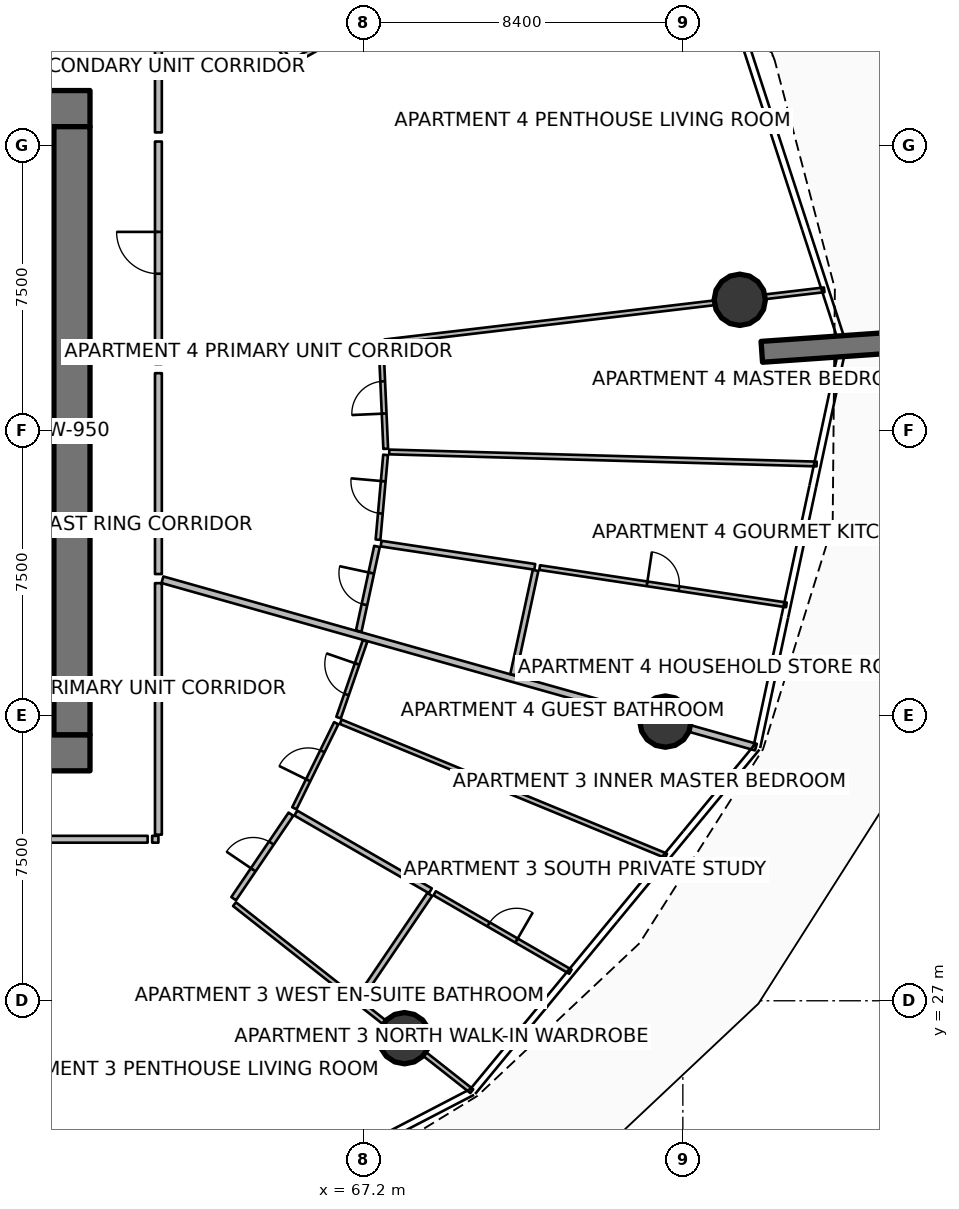
"""IFC4 building model, lengths in metres.
Left out: names, types, materials, properties, quantities, classifications, styles, units other than length and angle.
Written with IfcOpenShell. Run it as: python <this file> out.ifc"""

import sys

from ifc_helpers import new_model, si_unit, direction, frame, frame_2d, origin, origin_2d, place, context, subcontext, project, spatial, rectangle, circle, extrude, element, fill, save


model = new_model("IFC4")
c1 = context("Model", 3, precision=1e-05, world=origin(), true_north=direction((0.0, 1.0)))
c2 = subcontext(c1, "Body", "Model", "MODEL_VIEW")
j1 = project(units=[si_unit("LENGTHUNIT", "METRE"), si_unit("PLANEANGLEUNIT", "RADIAN")], contexts=[c1])
p1 = place(None, origin())
s1 = spatial("IfcSite", under=j1, at=p1, CompositionType="ELEMENT")
p2 = place(p1, origin())
s2 = spatial("IfcBuilding", under=s1, at=p2, CompositionType="ELEMENT")
p3 = place(p2, frame((0.0, 0.0, 26.4)))
s3 = spatial("IfcBuildingStorey", under=s2, at=p3, CompositionType="ELEMENT", Elevation=26.4)
for number, where, z_axis, x_axis in (
    (1, (49.95, 33.525, 0.0), (0.0, 0.0, 1.0), (1.0, 0.0, 0.0)),
    (2, (49.95, 50.475, 0.0), (0.0, 0.0, 1.0), (1.0, 0.0, 0.0)),
):
    element("IfcWall", number, at=place(p3, frame(where, z_axis=z_axis, x_axis=x_axis)), inside=s3, PredefinedType="SHEAR", context=c2, shape_type="SweptSolid", body=[
        extrude(rectangle(XDim=10.05, YDim=0.95, at=frame_2d((5.025, 0.0))), origin(), (0.0, 0.0, 1.0), 3.75),
    ])
p4 = place(p3, frame((59.525, 34.0, 0.0), z_axis=(0.0, 0.0, 1.0), x_axis=(0.0, 1.0, 0.0)))
e3 = element("IfcWall", 3, at=p4, inside=s3, PredefinedType="SHEAR", context=c2, shape_type="SweptSolid", body=[
    extrude(rectangle(XDim=16.0, YDim=0.95, at=frame_2d((8.0, 0.0))), origin(), (0.0, 0.0, 1.0), 3.75),
])
p5 = place(p3, frame((77.678, 44.075, 0.0), z_axis=(0.0, 0.0, 1.0), x_axis=(0.997564163539, 0.069754853754, 0.0)))
e4 = element("IfcWall", 4, at=p5, inside=s3, PredefinedType="SOLIDWALL", context=c2, shape_type="SweptSolid", body=[
    extrude(rectangle(XDim=3.5, YDim=0.55, at=frame_2d((1.75, 0.0))), origin(), (0.0, 0.0, 1.0), 3.75),
])
for number, where, z_axis, x_axis in (
    (5, (68.276, 26.016, 0.0), (0.0, 0.0, 1.0), (1.0, 0.0, 0.0)),
    (6, (75.141, 34.345, 0.0), (0.0, 0.0, 1.0), (1.0, 0.0, 0.0)),
    (7, (77.098, 45.444, 0.0), (0.0, 0.0, 1.0), (1.0, 0.0, 0.0)),
):
    element("IfcColumn", number, at=place(p3, frame(where, z_axis=z_axis, x_axis=x_axis)), inside=s3, PredefinedType="COLUMN", context=c2, shape_type="SweptSolid", body=[
        extrude(circle(Radius=0.675, at=origin_2d()), origin(), (0.0, 0.0, 1.0), 3.5),
    ])
p6 = place(p3, frame((51.48, 46.62, 0.0), z_axis=(0.0, 0.0, 1.0), x_axis=(1.0, 0.0, 0.0)))
e8 = element("IfcWall", 8, at=p6, inside=s3, PredefinedType="SOLIDWALL", context=c2, shape_type="SweptSolid", body=[
    extrude(rectangle(XDim=7.54, YDim=0.25, at=frame_2d((3.77, 0.0))), origin(), (0.0, 0.0, 1.0), 3.5),
])
p7 = place(p6, frame((0.3, 0.0, 0.0)))
e9 = element("IfcOpeningElement", 9, at=p7, cuts=e8, PredefinedType="OPENING", context=c2, shape_type="SweptSolid", body=[
    extrude(rectangle(XDim=1.55, YDim=2.15, at=frame_2d((0.775, 1.075))), frame((0.0, 0.135, 0.0), z_axis=(0.0, -1.0, 0.0), x_axis=(1.0, 0.0, 0.0)), (0.0, 0.0, 1.0), 0.27),
])
p8 = place(p3, frame((51.48, 37.38, 0.0), z_axis=(0.0, 0.0, 1.0), x_axis=(1.0, 0.0, 0.0)))
e10 = element("IfcWall", 10, at=p8, inside=s3, PredefinedType="SOLIDWALL", context=c2, shape_type="SweptSolid", body=[
    extrude(rectangle(XDim=7.54, YDim=0.25, at=frame_2d((3.77, 0.0))), origin(), (0.0, 0.0, 1.0), 3.5),
])
p9 = place(p8, frame((0.3, 0.0, 0.0)))
e11 = element("IfcOpeningElement", 11, at=p9, cuts=e10, PredefinedType="OPENING", context=c2, shape_type="SweptSolid", body=[
    extrude(rectangle(XDim=1.55, YDim=2.15, at=frame_2d((0.775, 1.075))), frame((0.0, 0.135, 0.0), z_axis=(0.0, -1.0, 0.0), x_axis=(1.0, 0.0, 0.0)), (0.0, 0.0, 1.0), 0.27),
])
p10 = place(p3, frame((61.906, 38.078, 0.0), z_axis=(0.0, 0.0, 1.0), x_axis=(0.962456328357, -0.271436578238, 0.0)))
e12 = element("IfcWall", 12, at=p10, inside=s3, PredefinedType="PARTITIONING", context=c2, shape_type="SweptSolid", body=[
    extrude(rectangle(XDim=16.226, YDim=0.18, at=frame_2d((8.113, 0.0))), origin(), (0.0, 0.0, 1.0), 2.867),
])
p11 = place(p3, frame((54.14, 31.25, 0.0), z_axis=(0.0, 0.0, 1.0), x_axis=(1.0, 0.0, 0.0)))
e13 = element("IfcWall", 13, at=p11, inside=s3, PredefinedType="PARTITIONING", context=c2, shape_type="SweptSolid", body=[
    extrude(rectangle(XDim=7.376, YDim=0.18, at=frame_2d((3.688, 0.0))), origin(), (0.0, 0.0, 1.0), 2.867),
])
p12 = place(p11, frame((3.138, 0.0, 0.0)))
e14 = element("IfcOpeningElement", 14, at=p12, cuts=e13, PredefinedType="OPENING", context=c2, shape_type="SweptSolid", body=[
    extrude(rectangle(XDim=1.1, YDim=2.1, at=frame_2d((0.55, 1.05))), frame((0.0, 0.1, 0.0), z_axis=(0.0, -1.0, 0.0), x_axis=(1.0, 0.0, 0.0)), (0.0, 0.0, 1.0), 0.2),
])
p13 = place(p3, frame((57.833, 24.443, 0.0), z_axis=(0.0, 0.0, 1.0), x_axis=(0.488621028367, -0.872496126431, 0.0)))
e15 = element("IfcWall", 15, at=p13, inside=s3, PredefinedType="PARTITIONING", context=c2, shape_type="SweptSolid", body=[
    extrude(rectangle(XDim=5.473, YDim=0.125, at=frame_2d((2.736, 0.0))), origin(), (0.0, 0.0, 1.0), 2.867),
])
p14 = place(p3, frame((61.636, 31.25, 0.0), z_axis=(0.0, 0.0, 1.0), x_axis=(1.0, 0.0, 0.0)))
e16 = element("IfcWall", 16, at=p14, inside=s3, PredefinedType="PARTITIONING", context=c2, shape_type="SweptSolid", body=[
    extrude(rectangle(XDim=0.164, YDim=0.18, at=frame_2d((0.082, 0.0))), origin(), (0.0, 0.0, 1.0), 2.867),
])
p15 = place(p3, frame((61.8, 31.37, 0.0), z_axis=(0.0, 0.0, 1.0), x_axis=(0.0, 1.0, 0.0)))
e17 = element("IfcWall", 17, at=p15, inside=s3, PredefinedType="PARTITIONING", context=c2, shape_type="SweptSolid", body=[
    extrude(rectangle(XDim=6.618, YDim=0.18, at=frame_2d((3.309, 0.0))), origin(), (0.0, 0.0, 1.0), 2.867),
])
p16 = place(p3, frame((63.803, 29.542, 0.0), z_axis=(0.0, 0.0, 1.0), x_axis=(0.785316547054, -0.619094436191, 0.0)))
e18 = element("IfcWall", 18, at=p16, inside=s3, PredefinedType="PARTITIONING", context=c2, shape_type="SweptSolid", body=[
    extrude(rectangle(XDim=7.949, YDim=0.125, at=frame_2d((3.975, 0.0))), origin(), (0.0, 0.0, 1.0), 2.867),
])
p17 = place(p3, frame((63.781, 29.687, 0.0), z_axis=(0.0, 0.0, 1.0), x_axis=(0.561145635053, 0.82771708709, 0.0)))
e19 = element("IfcWall", 19, at=p17, inside=s3, PredefinedType="PARTITIONING", context=c2, shape_type="SweptSolid", body=[
    extrude(rectangle(XDim=2.685, YDim=0.15, at=frame_2d((1.343, 0.0))), origin(), (0.0, 0.0, 1.0), 2.867),
])
p18 = place(p17, frame((0.918, 0.0, 0.0)))
e20 = element("IfcOpeningElement", 20, at=p18, cuts=e19, PredefinedType="OPENING", context=c2, shape_type="SweptSolid", body=[
    extrude(rectangle(XDim=0.85, YDim=2.06, at=frame_2d((0.425, 1.03))), frame((0.0, 0.085, 0.0), z_axis=(0.0, -1.0, 0.0), x_axis=(1.0, 0.0, 0.0)), (0.0, 0.0, 1.0), 0.17),
])
p19 = place(p3, frame((67.094, 27.074, 0.0), z_axis=(0.0, 0.0, 1.0), x_axis=(0.561136770773, 0.827723096504, 0.0)))
e21 = element("IfcWall", 21, at=p19, inside=s3, PredefinedType="PARTITIONING", context=c2, shape_type="SweptSolid", body=[
    extrude(rectangle(XDim=3.292, YDim=0.15, at=frame_2d((1.646, 0.0))), origin(), (0.0, 0.0, 1.0), 2.867),
])
p20 = place(p3, frame((65.416, 31.939, 0.0), z_axis=(0.0, 0.0, 1.0), x_axis=(0.865897249189, -0.500221904605, 0.0)))
e22 = element("IfcWall", 22, at=p20, inside=s3, PredefinedType="PARTITIONING", context=c2, shape_type="SweptSolid", body=[
    extrude(rectangle(XDim=4.09, YDim=0.15, at=frame_2d((2.045, 0.0))), origin(), (0.0, 0.0, 1.0), 2.94),
])
p21 = place(p3, frame((69.07, 29.828, 0.0), z_axis=(0.0, 0.0, 1.0), x_axis=(0.865913497337, -0.50019377758, 0.0)))
e23 = element("IfcWall", 23, at=p21, inside=s3, PredefinedType="PARTITIONING", context=c2, shape_type="SweptSolid", body=[
    extrude(rectangle(XDim=4.125, YDim=0.125, at=frame_2d((2.062, 0.0))), origin(), (0.0, 0.0, 1.0), 2.94),
])
p22 = place(p21, frame((1.637, 0.0, 0.0)))
e24 = element("IfcOpeningElement", 24, at=p22, cuts=e23, PredefinedType="OPENING", context=c2, shape_type="SweptSolid", body=[
    extrude(rectangle(XDim=0.85, YDim=2.06, at=frame_2d((0.425, 1.03))), frame((0.0, 0.073, 0.0), z_axis=(0.0, -1.0, 0.0), x_axis=(1.0, 0.0, 0.0)), (0.0, 0.0, 1.0), 0.145),
])
p23 = place(p3, frame((66.598, 34.341, 0.0), z_axis=(0.0, 0.0, 1.0), x_axis=(0.924661718137, -0.380789583645, 0.0)))
e25 = element("IfcWall", 25, at=p23, inside=s3, PredefinedType="PARTITIONING", context=c2, shape_type="SweptSolid", body=[
    extrude(rectangle(XDim=9.261, YDim=0.125, at=frame_2d((4.63, 0.0))), origin(), (0.0, 0.0, 1.0), 2.94),
])
p24 = place(p3, frame((65.377, 32.065, 0.0), z_axis=(0.0, 0.0, 1.0), x_axis=(0.441490145673, 0.897266098364, 0.0)))
e26 = element("IfcWall", 26, at=p24, inside=s3, PredefinedType="PARTITIONING", context=c2, shape_type="SweptSolid", body=[
    extrude(rectangle(XDim=2.495, YDim=0.125, at=frame_2d((1.248, 0.0))), origin(), (0.0, 0.0, 1.0), 2.94),
])
p25 = place(p24, frame((0.823, 0.0, 0.0)))
e27 = element("IfcOpeningElement", 27, at=p25, cuts=e26, PredefinedType="OPENING", context=c2, shape_type="SweptSolid", body=[
    extrude(rectangle(XDim=0.85, YDim=2.06, at=frame_2d((0.425, 1.03))), frame((0.0, 0.073, 0.0), z_axis=(0.0, -1.0, 0.0), x_axis=(1.0, 0.0, 0.0)), (0.0, 0.0, 1.0), 0.145),
])
p26 = place(p3, frame((66.541, 34.451, 0.0), z_axis=(0.0, 0.0, 1.0), x_axis=(0.326627883033, 0.945153017255, 0.0)))
e28 = element("IfcWall", 28, at=p26, inside=s3, PredefinedType="PARTITIONING", context=c2, shape_type="SweptSolid", body=[
    extrude(rectangle(XDim=2.137, YDim=0.125, at=frame_2d((1.068, 0.0))), origin(), (0.0, 0.0, 1.0), 2.867),
])
p27 = place(p26, frame((0.643, 0.0, 0.0)))
e29 = element("IfcOpeningElement", 29, at=p27, cuts=e28, PredefinedType="OPENING", context=c2, shape_type="SweptSolid", body=[
    extrude(rectangle(XDim=0.85, YDim=2.06, at=frame_2d((0.425, 1.03))), frame((0.0, 0.073, 0.0), z_axis=(0.0, -1.0, 0.0), x_axis=(1.0, 0.0, 0.0)), (0.0, 0.0, 1.0), 0.145),
])
p28 = place(p3, frame((61.8, 43.753, 0.0), z_axis=(0.0, 0.0, 1.0), x_axis=(0.0, 1.0, 0.0)))
e30 = element("IfcWall", 30, at=p28, inside=s3, PredefinedType="PARTITIONING", context=c2, shape_type="SweptSolid", body=[
    extrude(rectangle(XDim=5.855, YDim=0.18, at=frame_2d((2.927, 0.0))), origin(), (0.0, 0.0, 1.0), 2.867),
])
p29 = place(p28, frame((2.378, 0.0, 0.0)))
e31 = element("IfcOpeningElement", 31, at=p29, cuts=e30, PredefinedType="OPENING", context=c2, shape_type="SweptSolid", body=[
    extrude(rectangle(XDim=1.1, YDim=2.1, at=frame_2d((0.55, 1.05))), frame((0.0, 0.1, 0.0), z_axis=(0.0, -1.0, 0.0), x_axis=(1.0, 0.0, 0.0)), (0.0, 0.0, 1.0), 0.2),
])
p30 = place(p3, frame((61.8, 38.228, 0.0), z_axis=(0.0, 0.0, 1.0), x_axis=(0.0, 1.0, 0.0)))
e32 = element("IfcWall", 32, at=p30, inside=s3, PredefinedType="PARTITIONING", context=c2, shape_type="SweptSolid", body=[
    extrude(rectangle(XDim=5.285, YDim=0.18, at=frame_2d((2.643, 0.0))), origin(), (0.0, 0.0, 1.0), 2.867),
])
p31 = place(p3, frame((67.755, 44.338, 0.0), z_axis=(0.0, 0.0, 1.0), x_axis=(0.993067500076, 0.117545481801, 0.0)))
e33 = element("IfcWall", 33, at=p31, inside=s3, PredefinedType="PARTITIONING", context=c2, shape_type="SweptSolid", body=[
    extrude(rectangle(XDim=11.646, YDim=0.125, at=frame_2d((5.823, 0.0))), origin(), (0.0, 0.0, 1.0), 2.867),
])
p32 = place(p3, frame((67.071, 36.725, 0.0), z_axis=(0.0, 0.0, 1.0), x_axis=(0.210815805763, 0.977525803261, 0.0)))
e34 = element("IfcWall", 34, at=p32, inside=s3, PredefinedType="PARTITIONING", context=c2, shape_type="SweptSolid", body=[
    extrude(rectangle(XDim=2.28, YDim=0.15, at=frame_2d((1.14, 0.0))), origin(), (0.0, 0.0, 1.0), 2.867),
])
p33 = place(p32, frame((0.715, 0.0, 0.0)))
e35 = element("IfcOpeningElement", 35, at=p33, cuts=e34, PredefinedType="OPENING", context=c2, shape_type="SweptSolid", body=[
    extrude(rectangle(XDim=0.85, YDim=2.06, at=frame_2d((0.425, 1.03))), frame((0.0, 0.085, 0.0), z_axis=(0.0, -1.0, 0.0), x_axis=(1.0, 0.0, 0.0)), (0.0, 0.0, 1.0), 0.17),
])
p34 = place(p3, frame((71.133, 35.58, 0.0), z_axis=(0.0, 0.0, 1.0), x_axis=(0.21084765068, 0.977518934959, 0.0)))
e36 = element("IfcWall", 36, at=p34, inside=s3, PredefinedType="PARTITIONING", context=c2, shape_type="SweptSolid", body=[
    extrude(rectangle(XDim=2.807, YDim=0.15, at=frame_2d((1.403, 0.0))), origin(), (0.0, 0.0, 1.0), 2.867),
])
p35 = place(p3, frame((67.66, 39.029, 0.0), z_axis=(0.0, 0.0, 1.0), x_axis=(0.988765818212, -0.149472929776, 0.0)))
e37 = element("IfcWall", 37, at=p35, inside=s3, PredefinedType="PARTITIONING", context=c2, shape_type="SweptSolid", body=[
    extrude(rectangle(XDim=4.09, YDim=0.15, at=frame_2d((2.045, 0.0))), origin(), (0.0, 0.0, 1.0), 2.94),
])
p36 = place(p3, frame((71.832, 38.398, 0.0), z_axis=(0.0, 0.0, 1.0), x_axis=(0.988773501149, -0.149422098181, 0.0)))
e38 = element("IfcWall", 38, at=p36, inside=s3, PredefinedType="PARTITIONING", context=c2, shape_type="SweptSolid", body=[
    extrude(rectangle(XDim=6.567, YDim=0.125, at=frame_2d((3.283, 0.0))), origin(), (0.0, 0.0, 1.0), 2.94),
])
p37 = place(p36, frame((2.858, 0.0, 0.0)))
e39 = element("IfcOpeningElement", 39, at=p37, cuts=e38, PredefinedType="OPENING", context=c2, shape_type="SweptSolid", body=[
    extrude(rectangle(XDim=0.85, YDim=2.06, at=frame_2d((0.425, 1.03))), frame((0.0, 0.073, 0.0), z_axis=(0.0, -1.0, 0.0), x_axis=(1.0, 0.0, 0.0)), (0.0, 0.0, 1.0), 0.145),
])
p38 = place(p3, frame((67.875, 41.44, 0.0), z_axis=(0.0, 0.0, 1.0), x_axis=(0.999604383534, -0.028126080787, 0.0)))
e40 = element("IfcWall", 40, at=p38, inside=s3, PredefinedType="PARTITIONING", context=c2, shape_type="SweptSolid", body=[
    extrude(rectangle(XDim=11.25, YDim=0.125, at=frame_2d((5.625, 0.0))), origin(), (0.0, 0.0, 1.0), 2.94),
])
p39 = place(p3, frame((67.579, 39.132, 0.0), z_axis=(0.0, 0.0, 1.0), x_axis=(0.089032328007, 0.996028736819, 0.0)))
e41 = element("IfcWall", 41, at=p39, inside=s3, PredefinedType="PARTITIONING", context=c2, shape_type="SweptSolid", body=[
    extrude(rectangle(XDim=2.24, YDim=0.125, at=frame_2d((1.12, 0.0))), origin(), (0.0, 0.0, 1.0), 2.94),
])
p40 = place(p39, frame((0.695, 0.0, 0.0)))
e42 = element("IfcOpeningElement", 42, at=p40, cuts=e41, PredefinedType="OPENING", context=c2, shape_type="SweptSolid", body=[
    extrude(rectangle(XDim=0.85, YDim=2.06, at=frame_2d((0.425, 1.03))), frame((0.0, 0.073, 0.0), z_axis=(0.0, -1.0, 0.0), x_axis=(1.0, 0.0, 0.0)), (0.0, 0.0, 1.0), 0.145),
])
p41 = place(p3, frame((67.781, 41.523, 0.0), z_axis=(0.0, 0.0, 1.0), x_axis=(-0.044740706283, 0.998998633233, 0.0)))
e43 = element("IfcWall", 43, at=p41, inside=s3, PredefinedType="PARTITIONING", context=c2, shape_type="SweptSolid", body=[
    extrude(rectangle(XDim=2.707, YDim=0.125, at=frame_2d((1.353, 0.0))), origin(), (0.0, 0.0, 1.0), 2.867),
])
p42 = place(p41, frame((0.928, 0.0, 0.0)))
e44 = element("IfcOpeningElement", 44, at=p42, cuts=e43, PredefinedType="OPENING", context=c2, shape_type="SweptSolid", body=[
    extrude(rectangle(XDim=0.85, YDim=2.06, at=frame_2d((0.425, 1.03))), frame((0.0, 0.073, 0.0), z_axis=(0.0, -1.0, 0.0), x_axis=(1.0, 0.0, 0.0)), (0.0, 0.0, 1.0), 0.145),
])
p43 = place(p3, frame((61.8, 49.848, 0.0), z_axis=(0.0, 0.0, 1.0), x_axis=(0.0, 1.0, 0.0)))
e45 = element("IfcWall", 45, at=p43, inside=s3, PredefinedType="PARTITIONING", context=c2, shape_type="SweptSolid", body=[
    extrude(rectangle(XDim=2.781, YDim=0.18, at=frame_2d((1.391, 0.0))), origin(), (0.0, 0.0, 1.0), 2.867),
])
p44 = place(p3, frame((65.356, 51.72, 0.0), z_axis=(0.0, 0.0, 1.0), x_axis=(0.872502798549, 0.488609114246, 0.0)))
e46 = element("IfcWall", 46, at=p44, inside=s3, PredefinedType="PARTITIONING", context=c2, shape_type="SweptSolid", body=[
    extrude(rectangle(XDim=11.646, YDim=0.125, at=frame_2d((5.823, 0.0))), origin(), (0.0, 0.0, 1.0), 2.867),
])
p45 = place(p3, frame((65.225, 51.738, 0.0), z_axis=(0.0, 0.0, 1.0), x_axis=(-0.550602750552, 0.83476739939, 0.0)))
e47 = element("IfcWall", 47, at=p45, inside=s3, PredefinedType="PARTITIONING", context=c2, shape_type="SweptSolid", body=[
    extrude(rectangle(XDim=2.713, YDim=0.125, at=frame_2d((1.356, 0.0))), origin(), (0.0, 0.0, 1.0), 2.867),
])
p46 = place(p45, frame((0.932, 0.0, 0.0)))
e48 = element("IfcOpeningElement", 48, at=p46, cuts=e47, PredefinedType="OPENING", context=c2, shape_type="SweptSolid", body=[
    extrude(rectangle(XDim=0.85, YDim=2.06, at=frame_2d((0.425, 1.03))), frame((0.0, 0.073, 0.0), z_axis=(0.0, -1.0, 0.0), x_axis=(1.0, 0.0, 0.0)), (0.0, 0.0, 1.0), 0.145),
])
p47 = place(p18, origin())
e49 = element("IfcDoor", 49, at=p47, inside=s3, OperationType="SINGLE_SWING_LEFT", PredefinedType="DOOR", context=c2, shape_type="SweptSolid", body=[
    extrude(rectangle(XDim=0.85, YDim=2.06, at=frame_2d((0.425, 1.03))), frame((0.0, 0.025, 0.0), z_axis=(0.0, -1.0, 0.0), x_axis=(1.0, 0.0, 0.0)), (0.0, 0.0, 1.0), 0.05),
])
fill(e20, e49)
p48 = place(p22, origin())
e50 = element("IfcDoor", 50, at=p48, inside=s3, OperationType="SINGLE_SWING_RIGHT", PredefinedType="DOOR", context=c2, shape_type="SweptSolid", body=[
    extrude(rectangle(XDim=0.85, YDim=2.06, at=frame_2d((0.425, 1.03))), frame((0.0, 0.025, 0.0), z_axis=(0.0, -1.0, 0.0), x_axis=(1.0, 0.0, 0.0)), (0.0, 0.0, 1.0), 0.05),
])
fill(e24, e50)
p49 = place(p25, origin())
e51 = element("IfcDoor", 51, at=p49, inside=s3, OperationType="SINGLE_SWING_LEFT", PredefinedType="DOOR", context=c2, shape_type="SweptSolid", body=[
    extrude(rectangle(XDim=0.85, YDim=2.06, at=frame_2d((0.425, 1.03))), frame((0.0, 0.025, 0.0), z_axis=(0.0, -1.0, 0.0), x_axis=(1.0, 0.0, 0.0)), (0.0, 0.0, 1.0), 0.05),
])
fill(e27, e51)
p50 = place(p27, origin())
e52 = element("IfcDoor", 52, at=p50, inside=s3, OperationType="SINGLE_SWING_RIGHT", PredefinedType="DOOR", context=c2, shape_type="SweptSolid", body=[
    extrude(rectangle(XDim=0.85, YDim=2.06, at=frame_2d((0.425, 1.03))), frame((0.0, 0.025, 0.0), z_axis=(0.0, -1.0, 0.0), x_axis=(1.0, 0.0, 0.0)), (0.0, 0.0, 1.0), 0.05),
])
fill(e29, e52)
p51 = place(p29, origin())
e53 = element("IfcDoor", 53, at=p51, inside=s3, OperationType="SINGLE_SWING_RIGHT", PredefinedType="DOOR", context=c2, shape_type="SweptSolid", body=[
    extrude(rectangle(XDim=1.1, YDim=2.1, at=frame_2d((0.55, 1.05))), frame((0.0, 0.025, 0.0), z_axis=(0.0, -1.0, 0.0), x_axis=(1.0, 0.0, 0.0)), (0.0, 0.0, 1.0), 0.05),
])
fill(e31, e53)
p52 = place(p33, origin())
e54 = element("IfcDoor", 54, at=p52, inside=s3, OperationType="SINGLE_SWING_RIGHT", PredefinedType="DOOR", context=c2, shape_type="SweptSolid", body=[
    extrude(rectangle(XDim=0.85, YDim=2.06, at=frame_2d((0.425, 1.03))), frame((0.0, 0.025, 0.0), z_axis=(0.0, -1.0, 0.0), x_axis=(1.0, 0.0, 0.0)), (0.0, 0.0, 1.0), 0.05),
])
fill(e35, e54)
p53 = place(p37, origin())
e55 = element("IfcDoor", 55, at=p53, inside=s3, OperationType="SINGLE_SWING_LEFT", PredefinedType="DOOR", context=c2, shape_type="SweptSolid", body=[
    extrude(rectangle(XDim=0.85, YDim=2.06, at=frame_2d((0.425, 1.03))), frame((0.0, 0.025, 0.0), z_axis=(0.0, -1.0, 0.0), x_axis=(1.0, 0.0, 0.0)), (0.0, 0.0, 1.0), 0.05),
])
fill(e39, e55)
p54 = place(p40, origin())
e56 = element("IfcDoor", 56, at=p54, inside=s3, OperationType="SINGLE_SWING_RIGHT", PredefinedType="DOOR", context=c2, shape_type="SweptSolid", body=[
    extrude(rectangle(XDim=0.85, YDim=2.06, at=frame_2d((0.425, 1.03))), frame((0.0, 0.025, 0.0), z_axis=(0.0, -1.0, 0.0), x_axis=(1.0, 0.0, 0.0)), (0.0, 0.0, 1.0), 0.05),
])
fill(e42, e56)
p55 = place(p42, origin())
e57 = element("IfcDoor", 57, at=p55, inside=s3, OperationType="SINGLE_SWING_LEFT", PredefinedType="DOOR", context=c2, shape_type="SweptSolid", body=[
    extrude(rectangle(XDim=0.85, YDim=2.06, at=frame_2d((0.425, 1.03))), frame((0.0, 0.025, 0.0), z_axis=(0.0, -1.0, 0.0), x_axis=(1.0, 0.0, 0.0)), (0.0, 0.0, 1.0), 0.05),
])
fill(e44, e57)
save(model, sys.argv[1])
